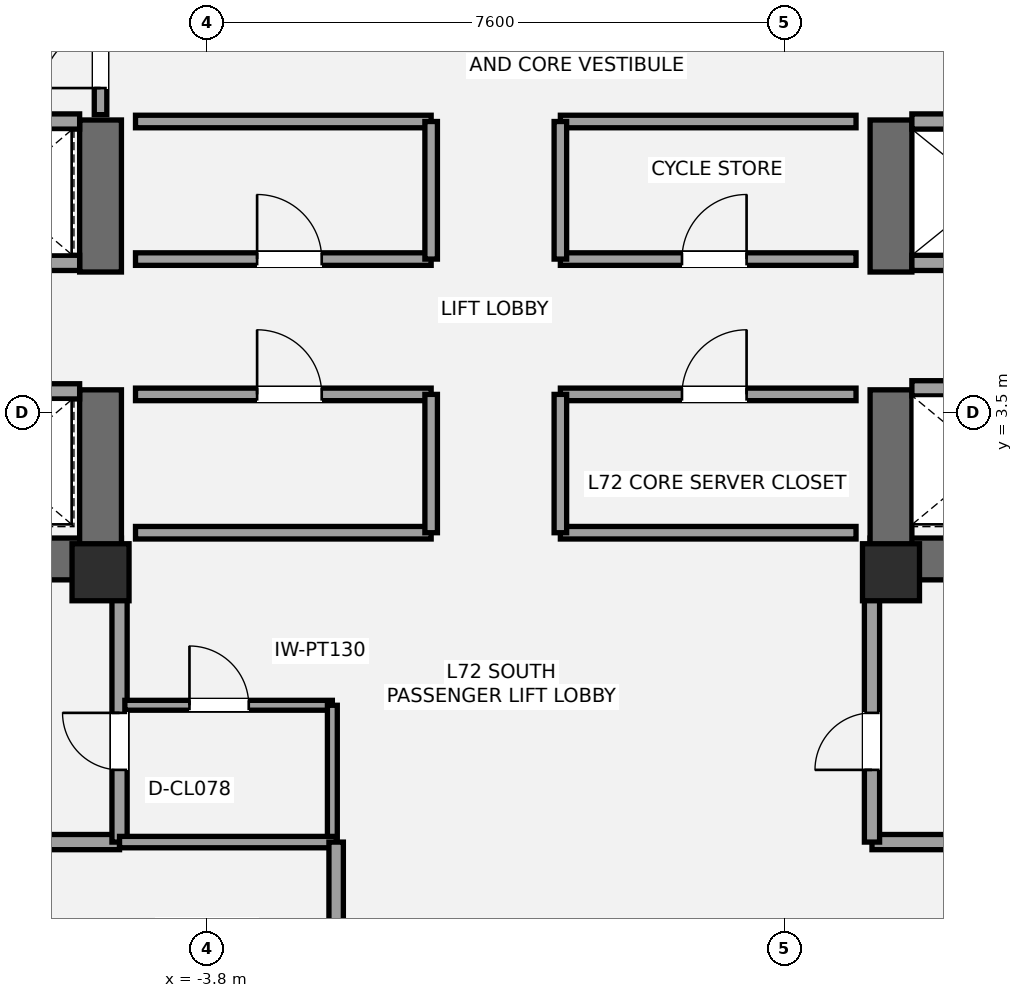
"""IFC4 building model, lengths in metres.
Left out: names, types, materials, properties, quantities, classifications, styles, units other than length and angle.
Written with IfcOpenShell. Run it as: python <this file> out.ifc"""

import sys

from ifc_helpers import new_model, si_unit, direction, frame, frame_2d, origin, origin_2d, place, context, subcontext, project, spatial, rectangle, extrude, element, fill, save


model = new_model("IFC4")
c1 = context("Model", 3, precision=1e-05, world=origin(), true_north=direction((0.0, 1.0)))
c2 = subcontext(c1, "Body", "Model", "MODEL_VIEW")
j1 = project(units=[si_unit("LENGTHUNIT", "METRE"), si_unit("PLANEANGLEUNIT", "RADIAN")], contexts=[c1])
p1 = place(None, origin())
s1 = spatial("IfcSite", under=j1, at=p1, CompositionType="ELEMENT")
p2 = place(p1, origin())
s2 = spatial("IfcBuilding", under=s1, at=p2, CompositionType="ELEMENT")
p3 = place(p2, frame((0.0, 0.0, 254.1)))
s3 = spatial("IfcBuildingStorey", under=s2, at=p3, CompositionType="ELEMENT", Elevation=254.1)
p4 = place(p3, frame((-4.925, 1.575, 0.0), z_axis=(0.0, 0.0, 1.0), x_axis=(-1.0, 0.0, 0.0)))
e1 = element("IfcWall", 1, at=p4, inside=s3, PredefinedType="SHEAR", context=c2, shape_type="SweptSolid", body=[
    extrude(rectangle(XDim=8.775, YDim=0.55, at=frame_2d((4.387, 0.0))), origin(), (0.0, 0.0, 1.0), 3.15),
])
p5 = place(p4, frame((5.375, 0.0, 0.0)))
e2 = element("IfcOpeningElement", 2, at=p5, cuts=e1, PredefinedType="OPENING", context=c2, shape_type="SweptSolid", body=[
    extrude(rectangle(XDim=1.05, YDim=2.15, at=frame_2d((0.525, 1.075))), frame((0.0, 0.285, 0.0), z_axis=(0.0, -1.0, 0.0), x_axis=(1.0, 0.0, 0.0)), (0.0, 0.0, 1.0), 0.57),
])
p6 = place(p4, frame((3.705, 0.0, 0.0)))
e3 = element("IfcOpeningElement", 3, at=p6, cuts=e1, PredefinedType="OPENING", context=c2, shape_type="SweptSolid", body=[
    extrude(rectangle(XDim=1.1, YDim=2.2, at=frame_2d((0.55, 1.1))), frame((0.0, 0.285, 0.0), z_axis=(0.0, -1.0, 0.0), x_axis=(1.0, 0.0, 0.0)), (0.0, 0.0, 1.0), 0.57),
])
p7 = place(p3, frame((-5.2, 1.3, 0.0), z_axis=(0.0, 0.0, 1.0), x_axis=(0.0, 1.0, 0.0)))
e4 = element("IfcWall", 4, at=p7, inside=s3, PredefinedType="SHEAR", context=c2, shape_type="SweptSolid", body=[
    extrude(rectangle(XDim=2.5, YDim=0.55, at=frame_2d((1.25, 0.0))), origin(), (0.0, 0.0, 1.0), 3.15),
])
p8 = place(p3, frame((-5.2, 5.35, 0.0), z_axis=(0.0, 0.0, 1.0), x_axis=(0.0, 1.0, 0.0)))
e5 = element("IfcWall", 5, at=p8, inside=s3, PredefinedType="SHEAR", context=c2, shape_type="SweptSolid", body=[
    extrude(rectangle(XDim=2.0, YDim=0.55, at=frame_2d((1.0, 0.0))), origin(), (0.0, 0.0, 1.0), 3.15),
])
p9 = place(p3, frame((13.7, 1.575, 0.0), z_axis=(0.0, 0.0, 1.0), x_axis=(-1.0, 0.0, 0.0)))
e6 = element("IfcWall", 6, at=p9, inside=s3, PredefinedType="SHEAR", context=c2, shape_type="SweptSolid", body=[
    extrude(rectangle(XDim=8.775, YDim=0.55, at=frame_2d((4.387, 0.0))), origin(), (0.0, 0.0, 1.0), 3.15),
])
p10 = place(p9, frame((2.35, 0.0, 0.0)))
e7 = element("IfcOpeningElement", 7, at=p10, cuts=e6, PredefinedType="OPENING", context=c2, shape_type="SweptSolid", body=[
    extrude(rectangle(XDim=1.05, YDim=2.15, at=frame_2d((0.525, 1.075))), frame((0.0, 0.285, 0.0), z_axis=(0.0, -1.0, 0.0), x_axis=(1.0, 0.0, 0.0)), (0.0, 0.0, 1.0), 0.57),
])
p11 = place(p9, frame((4.35, 0.0, 0.0)))
e8 = element("IfcOpeningElement", 8, at=p11, cuts=e6, PredefinedType="OPENING", context=c2, shape_type="SweptSolid", body=[
    extrude(rectangle(XDim=1.1, YDim=2.2, at=frame_2d((0.55, 1.1))), frame((0.0, 0.285, 0.0), z_axis=(0.0, -1.0, 0.0), x_axis=(1.0, 0.0, 0.0)), (0.0, 0.0, 1.0), 0.57),
])
p12 = place(p3, frame((5.2, 1.3, 0.0), z_axis=(0.0, 0.0, 1.0), x_axis=(0.0, 1.0, 0.0)))
e9 = element("IfcWall", 9, at=p12, inside=s3, PredefinedType="SHEAR", context=c2, shape_type="SweptSolid", body=[
    extrude(rectangle(XDim=2.5, YDim=0.55, at=frame_2d((1.25, 0.0))), origin(), (0.0, 0.0, 1.0), 3.15),
])
p13 = place(p3, frame((5.2, 5.35, 0.0), z_axis=(0.0, 0.0, 1.0), x_axis=(0.0, 1.0, 0.0)))
e10 = element("IfcWall", 10, at=p13, inside=s3, PredefinedType="SHEAR", context=c2, shape_type="SweptSolid", body=[
    extrude(rectangle(XDim=2.0, YDim=0.55, at=frame_2d((1.0, 0.0))), origin(), (0.0, 0.0, 1.0), 3.15),
])
for number, where, z_axis, x_axis in (
    (11, (-5.2, 1.4, 0.0), (0.0, 0.0, 1.0), (1.0, 0.0, 0.0)),
    (12, (5.2, 1.4, 0.0), (0.0, 0.0, 1.0), (1.0, 0.0, 0.0)),
):
    element("IfcColumn", number, at=place(p3, frame(where, z_axis=z_axis, x_axis=x_axis)), inside=s3, PredefinedType="PILASTER", context=c2, shape_type="SweptSolid", body=[
        extrude(rectangle(XDim=0.75, YDim=0.75, at=origin_2d()), origin(), (0.0, 0.0, 1.0), 3.15),
    ])
p14 = place(p3, frame((-7.2, -2.15, 0.0), z_axis=(0.0, 0.0, 1.0), x_axis=(1.0, 0.0, 0.0)))
e13 = element("IfcWall", 13, at=p14, inside=s3, PredefinedType="SOLIDWALL", context=c2, shape_type="SweptSolid", body=[
    extrude(rectangle(XDim=2.25, YDim=0.2, at=frame_2d((1.125, 0.0))), origin(), (0.0, 0.0, 1.0), 2.97),
])
p15 = place(p3, frame((-4.95, -2.15, 0.0), z_axis=(0.0, 0.0, 1.0), x_axis=(0.0, 1.0, 0.0)))
e14 = element("IfcWall", 14, at=p15, inside=s3, PredefinedType="SOLIDWALL", context=c2, shape_type="SweptSolid", body=[
    extrude(rectangle(XDim=3.5, YDim=0.2, at=frame_2d((1.75, 0.0))), origin(), (0.0, 0.0, 1.0), 2.423),
])
p16 = place(p15, frame((0.95, 0.0, 0.0)))
e15 = element("IfcOpeningElement", 15, at=p16, cuts=e14, PredefinedType="OPENING", context=c2, shape_type="SweptSolid", body=[
    extrude(rectangle(XDim=0.75, YDim=2.1, at=frame_2d((0.375, 1.05))), frame((0.0, 0.11, 0.0), z_axis=(0.0, -1.0, 0.0), x_axis=(1.0, 0.0, 0.0)), (0.0, 0.0, 1.0), 0.22),
])
p17 = place(p3, frame((4.95, -2.15, 0.0), z_axis=(0.0, 0.0, 1.0), x_axis=(1.0, 0.0, 0.0)))
e16 = element("IfcWall", 16, at=p17, inside=s3, PredefinedType="SOLIDWALL", context=c2, shape_type="SweptSolid", body=[
    extrude(rectangle(XDim=2.25, YDim=0.2, at=frame_2d((1.125, 0.0))), origin(), (0.0, 0.0, 1.0), 2.97),
])
p18 = place(p3, frame((4.95, -2.15, 0.0), z_axis=(0.0, 0.0, 1.0), x_axis=(0.0, 1.0, 0.0)))
e17 = element("IfcWall", 17, at=p18, inside=s3, PredefinedType="SOLIDWALL", context=c2, shape_type="SweptSolid", body=[
    extrude(rectangle(XDim=3.5, YDim=0.2, at=frame_2d((1.75, 0.0))), origin(), (0.0, 0.0, 1.0), 2.423),
])
p19 = place(p18, frame((0.95, 0.0, 0.0)))
e18 = element("IfcOpeningElement", 18, at=p19, cuts=e17, PredefinedType="OPENING", context=c2, shape_type="SweptSolid", body=[
    extrude(rectangle(XDim=0.75, YDim=2.1, at=frame_2d((0.375, 1.05))), frame((0.0, 0.11, 0.0), z_axis=(0.0, -1.0, 0.0), x_axis=(1.0, 0.0, 0.0)), (0.0, 0.0, 1.0), 0.22),
])
p20 = place(p3, frame((-4.88, -0.35, 0.0), z_axis=(0.0, 0.0, 1.0), x_axis=(1.0, 0.0, 0.0)))
e19 = element("IfcWall", 19, at=p20, inside=s3, PredefinedType="PARTITIONING", context=c2, shape_type="SweptSolid", body=[
    extrude(rectangle(XDim=2.73, YDim=0.13, at=frame_2d((1.365, 0.0))), origin(), (0.0, 0.0, 1.0), 2.97),
])
p21 = place(p20, frame((0.85, 0.0, 0.0)))
e20 = element("IfcOpeningElement", 20, at=p21, cuts=e19, PredefinedType="OPENING", context=c2, shape_type="SweptSolid", body=[
    extrude(rectangle(XDim=0.78, YDim=2.1, at=frame_2d((0.39, 1.05))), frame((0.0, 0.075, 0.0), z_axis=(0.0, -1.0, 0.0), x_axis=(1.0, 0.0, 0.0)), (0.0, 0.0, 1.0), 0.15),
])
p22 = place(p3, frame((-2.15, -2.15, 0.0), z_axis=(0.0, 0.0, 1.0), x_axis=(0.0, 1.0, 0.0)))
e21 = element("IfcWall", 21, at=p22, inside=s3, PredefinedType="PARTITIONING", context=c2, shape_type="SweptSolid", body=[
    extrude(rectangle(XDim=1.8, YDim=0.13, at=frame_2d((0.9, 0.0))), origin(), (0.0, 0.0, 1.0), 2.97),
])
p23 = place(p3, frame((-9.78, 3.78, 0.0), z_axis=(0.0, 0.0, 1.0), x_axis=(1.0, 0.0, 0.0)))
e22 = element("IfcWall", 22, at=p23, inside=s3, PredefinedType="SOLIDWALL", context=c2, shape_type="SweptSolid", body=[
    extrude(rectangle(XDim=4.305, YDim=0.2, at=frame_2d((2.152, 0.0))), origin(), (0.0, 0.0, 1.0), 2.97),
])
p24 = place(p23, frame((2.72, 0.0, 0.0)))
e23 = element("IfcOpeningElement", 23, at=p24, cuts=e22, PredefinedType="OPENING", context=c2, shape_type="SweptSolid", body=[
    extrude(rectangle(XDim=1.1, YDim=2.2, at=frame_2d((0.55, 1.1))), frame((0.0, 0.11, 0.0), z_axis=(0.0, -1.0, 0.0), x_axis=(1.0, 0.0, 0.0)), (0.0, 0.0, 1.0), 0.22),
])
p25 = place(p3, frame((-9.78, 5.47, 0.0), z_axis=(0.0, 0.0, 1.0), x_axis=(1.0, 0.0, 0.0)))
e24 = element("IfcWall", 24, at=p25, inside=s3, PredefinedType="SOLIDWALL", context=c2, shape_type="SweptSolid", body=[
    extrude(rectangle(XDim=4.305, YDim=0.2, at=frame_2d((2.152, 0.0))), origin(), (0.0, 0.0, 1.0), 2.97),
])
p26 = place(p25, frame((0.55, 0.0, 0.0)))
e25 = element("IfcOpeningElement", 25, at=p26, cuts=e24, PredefinedType="OPENING", context=c2, shape_type="SweptSolid", body=[
    extrude(rectangle(XDim=1.1, YDim=2.2, at=frame_2d((0.55, 1.1))), frame((0.0, 0.11, 0.0), z_axis=(0.0, -1.0, 0.0), x_axis=(1.0, 0.0, 0.0)), (0.0, 0.0, 1.0), 0.22),
])
p27 = place(p25, frame((2.72, 0.0, 0.0)))
e26 = element("IfcOpeningElement", 26, at=p27, cuts=e24, PredefinedType="OPENING", context=c2, shape_type="SweptSolid", body=[
    extrude(rectangle(XDim=1.1, YDim=2.2, at=frame_2d((0.55, 1.1))), frame((0.0, 0.11, 0.0), z_axis=(0.0, -1.0, 0.0), x_axis=(1.0, 0.0, 0.0)), (0.0, 0.0, 1.0), 0.22),
])
p28 = place(p3, frame((-9.78, 7.33, 0.0), z_axis=(0.0, 0.0, 1.0), x_axis=(1.0, 0.0, 0.0)))
e27 = element("IfcWall", 27, at=p28, inside=s3, PredefinedType="SOLIDWALL", context=c2, shape_type="SweptSolid", body=[
    extrude(rectangle(XDim=4.305, YDim=0.2, at=frame_2d((2.152, 0.0))), origin(), (0.0, 0.0, 1.0), 2.97),
])
p29 = place(p3, frame((5.475, 3.82, 0.0), z_axis=(0.0, 0.0, 1.0), x_axis=(1.0, 0.0, 0.0)))
e28 = element("IfcWall", 28, at=p29, inside=s3, PredefinedType="SOLIDWALL", context=c2, shape_type="SweptSolid", body=[
    extrude(rectangle(XDim=4.305, YDim=0.2, at=frame_2d((2.152, 0.0))), origin(), (0.0, 0.0, 1.0), 2.97),
])
p30 = place(p29, frame((0.65, 0.0, 0.0)))
e29 = element("IfcOpeningElement", 29, at=p30, cuts=e28, PredefinedType="OPENING", context=c2, shape_type="SweptSolid", body=[
    extrude(rectangle(XDim=1.2, YDim=2.2, at=frame_2d((0.6, 1.1))), frame((0.0, 0.11, 0.0), z_axis=(0.0, -1.0, 0.0), x_axis=(1.0, 0.0, 0.0)), (0.0, 0.0, 1.0), 0.22),
])
for number, where, z_axis, x_axis in (
    (30, (5.475, 5.47, 0.0), (0.0, 0.0, 1.0), (1.0, 0.0, 0.0)),
    (31, (5.475, 7.33, 0.0), (0.0, 0.0, 1.0), (1.0, 0.0, 0.0)),
):
    element("IfcWall", number, at=place(p3, frame(where, z_axis=z_axis, x_axis=x_axis)), inside=s3, PredefinedType="SOLIDWALL", context=c2, shape_type="SweptSolid", body=[
        extrude(rectangle(XDim=4.305, YDim=0.2, at=frame_2d((2.152, 0.0))), origin(), (0.0, 0.0, 1.0), 2.97),
    ])
p31 = place(p3, frame((-4.74, 1.92, 0.0), z_axis=(0.0, 0.0, 1.0), x_axis=(1.0, 0.0, 0.0)))
e32 = element("IfcWall", 32, at=p31, inside=s3, PredefinedType="PARTITIONING", context=c2, shape_type="SweptSolid", body=[
    extrude(rectangle(XDim=3.89, YDim=0.165, at=frame_2d((1.945, 0.0))), origin(), (0.0, 0.0, 1.0), 2.11),
])
p32 = place(p3, frame((-4.74, 3.74, 0.0), z_axis=(0.0, 0.0, 1.0), x_axis=(1.0, 0.0, 0.0)))
e33 = element("IfcWall", 33, at=p32, inside=s3, PredefinedType="PARTITIONING", context=c2, shape_type="SweptSolid", body=[
    extrude(rectangle(XDim=3.89, YDim=0.165, at=frame_2d((1.945, 0.0))), origin(), (0.0, 0.0, 1.0), 2.97),
])
p33 = place(p32, frame((1.6, 0.0, 0.0)))
e34 = element("IfcOpeningElement", 34, at=p33, cuts=e33, PredefinedType="OPENING", context=c2, shape_type="SweptSolid", body=[
    extrude(rectangle(XDim=0.85, YDim=2.1, at=frame_2d((0.425, 1.05))), frame((0.0, 0.093, 0.0), z_axis=(0.0, -1.0, 0.0), x_axis=(1.0, 0.0, 0.0)), (0.0, 0.0, 1.0), 0.185),
])
p34 = place(p3, frame((-0.85, 1.92, 0.0), z_axis=(0.0, 0.0, 1.0), x_axis=(0.0, 1.0, 0.0)))
e35 = element("IfcWall", 35, at=p34, inside=s3, PredefinedType="PARTITIONING", context=c2, shape_type="SweptSolid", body=[
    extrude(rectangle(XDim=1.82, YDim=0.165, at=frame_2d((0.91, 0.0))), origin(), (0.0, 0.0, 1.0), 2.97),
])
p35 = place(p3, frame((0.85, 1.92, 0.0), z_axis=(0.0, 0.0, 1.0), x_axis=(1.0, 0.0, 0.0)))
e36 = element("IfcWall", 36, at=p35, inside=s3, PredefinedType="PARTITIONING", context=c2, shape_type="SweptSolid", body=[
    extrude(rectangle(XDim=3.89, YDim=0.165, at=frame_2d((1.945, 0.0))), origin(), (0.0, 0.0, 1.0), 2.11),
])
p36 = place(p3, frame((0.85, 3.74, 0.0), z_axis=(0.0, 0.0, 1.0), x_axis=(1.0, 0.0, 0.0)))
e37 = element("IfcWall", 37, at=p36, inside=s3, PredefinedType="PARTITIONING", context=c2, shape_type="SweptSolid", body=[
    extrude(rectangle(XDim=3.89, YDim=0.165, at=frame_2d((1.945, 0.0))), origin(), (0.0, 0.0, 1.0), 2.97),
])
p37 = place(p36, frame((1.6, 0.0, 0.0)))
e38 = element("IfcOpeningElement", 38, at=p37, cuts=e37, PredefinedType="OPENING", context=c2, shape_type="SweptSolid", body=[
    extrude(rectangle(XDim=0.85, YDim=2.1, at=frame_2d((0.425, 1.05))), frame((0.0, 0.093, 0.0), z_axis=(0.0, -1.0, 0.0), x_axis=(1.0, 0.0, 0.0)), (0.0, 0.0, 1.0), 0.185),
])
p38 = place(p3, frame((0.85, 1.92, 0.0), z_axis=(0.0, 0.0, 1.0), x_axis=(0.0, 1.0, 0.0)))
e39 = element("IfcWall", 39, at=p38, inside=s3, PredefinedType="PARTITIONING", context=c2, shape_type="SweptSolid", body=[
    extrude(rectangle(XDim=1.82, YDim=0.165, at=frame_2d((0.91, 0.0))), origin(), (0.0, 0.0, 1.0), 2.97),
])
p39 = place(p3, frame((-4.74, 5.52, 0.0), z_axis=(0.0, 0.0, 1.0), x_axis=(1.0, 0.0, 0.0)))
e40 = element("IfcWall", 40, at=p39, inside=s3, PredefinedType="PARTITIONING", context=c2, shape_type="SweptSolid", body=[
    extrude(rectangle(XDim=3.89, YDim=0.165, at=frame_2d((1.945, 0.0))), origin(), (0.0, 0.0, 1.0), 2.97),
])
p40 = place(p39, frame((1.6, 0.0, 0.0)))
e41 = element("IfcOpeningElement", 41, at=p40, cuts=e40, PredefinedType="OPENING", context=c2, shape_type="SweptSolid", body=[
    extrude(rectangle(XDim=0.85, YDim=2.1, at=frame_2d((0.425, 1.05))), frame((0.0, 0.093, 0.0), z_axis=(0.0, -1.0, 0.0), x_axis=(1.0, 0.0, 0.0)), (0.0, 0.0, 1.0), 0.185),
])
p41 = place(p3, frame((-4.74, 7.33, 0.0), z_axis=(0.0, 0.0, 1.0), x_axis=(1.0, 0.0, 0.0)))
e42 = element("IfcWall", 42, at=p41, inside=s3, PredefinedType="PARTITIONING", context=c2, shape_type="SweptSolid", body=[
    extrude(rectangle(XDim=3.89, YDim=0.165, at=frame_2d((1.945, 0.0))), origin(), (0.0, 0.0, 1.0), 2.97),
])
p42 = place(p3, frame((-0.85, 5.52, 0.0), z_axis=(0.0, 0.0, 1.0), x_axis=(0.0, 1.0, 0.0)))
e43 = element("IfcWall", 43, at=p42, inside=s3, PredefinedType="PARTITIONING", context=c2, shape_type="SweptSolid", body=[
    extrude(rectangle(XDim=1.81, YDim=0.165, at=frame_2d((0.905, 0.0))), origin(), (0.0, 0.0, 1.0), 2.97),
])
p43 = place(p3, frame((0.85, 5.52, 0.0), z_axis=(0.0, 0.0, 1.0), x_axis=(1.0, 0.0, 0.0)))
e44 = element("IfcWall", 44, at=p43, inside=s3, PredefinedType="PARTITIONING", context=c2, shape_type="SweptSolid", body=[
    extrude(rectangle(XDim=3.89, YDim=0.165, at=frame_2d((1.945, 0.0))), origin(), (0.0, 0.0, 1.0), 2.97),
])
p44 = place(p43, frame((1.6, 0.0, 0.0)))
e45 = element("IfcOpeningElement", 45, at=p44, cuts=e44, PredefinedType="OPENING", context=c2, shape_type="SweptSolid", body=[
    extrude(rectangle(XDim=0.85, YDim=2.1, at=frame_2d((0.425, 1.05))), frame((0.0, 0.093, 0.0), z_axis=(0.0, -1.0, 0.0), x_axis=(1.0, 0.0, 0.0)), (0.0, 0.0, 1.0), 0.185),
])
p45 = place(p3, frame((0.85, 7.33, 0.0), z_axis=(0.0, 0.0, 1.0), x_axis=(1.0, 0.0, 0.0)))
e46 = element("IfcWall", 46, at=p45, inside=s3, PredefinedType="PARTITIONING", context=c2, shape_type="SweptSolid", body=[
    extrude(rectangle(XDim=3.89, YDim=0.165, at=frame_2d((1.945, 0.0))), origin(), (0.0, 0.0, 1.0), 2.97),
])
p46 = place(p3, frame((0.85, 5.52, 0.0), z_axis=(0.0, 0.0, 1.0), x_axis=(0.0, 1.0, 0.0)))
e47 = element("IfcWall", 47, at=p46, inside=s3, PredefinedType="PARTITIONING", context=c2, shape_type="SweptSolid", body=[
    extrude(rectangle(XDim=1.81, YDim=0.165, at=frame_2d((0.905, 0.0))), origin(), (0.0, 0.0, 1.0), 2.97),
])
p47 = place(p3, frame((-5.2, 7.42, 0.0), z_axis=(0.0, 0.0, 1.0), x_axis=(0.0, 1.0, 0.0)))
e48 = element("IfcWall", 48, at=p47, inside=s3, PredefinedType="PARTITIONING", context=c2, shape_type="SweptSolid", body=[
    extrude(rectangle(XDim=1.58, YDim=0.165, at=frame_2d((0.79, 0.0))), origin(), (0.0, 0.0, 1.0), 2.97),
])
p48 = place(p47, frame((0.35, 0.0, 0.0)))
e49 = element("IfcOpeningElement", 49, at=p48, cuts=e48, PredefinedType="OPENING", context=c2, shape_type="SweptSolid", body=[
    extrude(rectangle(XDim=0.75, YDim=2.1, at=frame_2d((0.375, 1.05))), frame((0.0, 0.093, 0.0), z_axis=(0.0, -1.0, 0.0), x_axis=(1.0, 0.0, 0.0)), (0.0, 0.0, 1.0), 0.185),
])
p49 = place(p3, frame((-4.95, -2.15, 0.0), z_axis=(0.0, 0.0, 1.0), x_axis=(1.0, 0.0, 0.0)))
e50 = element("IfcWall", 50, at=p49, inside=s3, PredefinedType="PLUMBINGWALL", context=c2, shape_type="SweptSolid", body=[
    extrude(rectangle(XDim=2.85, YDim=0.15, at=frame_2d((1.425, 0.0))), origin(), (0.0, 0.0, 1.0), 2.423),
])
p50 = place(p3, frame((-2.1, -4.05, 0.0), z_axis=(0.0, 0.0, 1.0), x_axis=(0.0, 1.0, 0.0)))
e51 = element("IfcWall", 51, at=p50, inside=s3, PredefinedType="PLUMBINGWALL", context=c2, shape_type="SweptSolid", body=[
    extrude(rectangle(XDim=1.9, YDim=0.19, at=frame_2d((0.95, 0.0))), origin(), (0.0, 0.0, 1.0), 2.423),
])
p51 = place(p16, origin())
e52 = element("IfcDoor", 52, at=p51, inside=s3, OperationType="SINGLE_SWING_RIGHT", PredefinedType="DOOR", context=c2, shape_type="SweptSolid", body=[
    extrude(rectangle(XDim=0.75, YDim=2.1, at=frame_2d((0.375, 1.05))), frame((0.0, 0.025, 0.0), z_axis=(0.0, -1.0, 0.0), x_axis=(1.0, 0.0, 0.0)), (0.0, 0.0, 1.0), 0.05),
])
fill(e15, e52)
p52 = place(p19, origin())
e53 = element("IfcDoor", 53, at=p52, inside=s3, OperationType="SINGLE_SWING_LEFT", PredefinedType="DOOR", context=c2, shape_type="SweptSolid", body=[
    extrude(rectangle(XDim=0.75, YDim=2.1, at=frame_2d((0.375, 1.05))), frame((0.0, 0.025, 0.0), z_axis=(0.0, -1.0, 0.0), x_axis=(1.0, 0.0, 0.0)), (0.0, 0.0, 1.0), 0.05),
])
fill(e18, e53)
p53 = place(p21, origin())
e54 = element("IfcDoor", 54, at=p53, inside=s3, OperationType="SINGLE_SWING_LEFT", PredefinedType="DOOR", context=c2, shape_type="SweptSolid", body=[
    extrude(rectangle(XDim=0.78, YDim=2.1, at=frame_2d((0.39, 1.05))), frame((0.0, 0.025, 0.0), z_axis=(0.0, -1.0, 0.0), x_axis=(1.0, 0.0, 0.0)), (0.0, 0.0, 1.0), 0.05),
])
fill(e20, e54)
p54 = place(p33, origin())
e55 = element("IfcDoor", 55, at=p54, inside=s3, OperationType="SINGLE_SWING_LEFT", PredefinedType="DOOR", context=c2, shape_type="SweptSolid", body=[
    extrude(rectangle(XDim=0.85, YDim=2.1, at=frame_2d((0.425, 1.05))), frame((0.0, 0.025, 0.0), z_axis=(0.0, -1.0, 0.0), x_axis=(1.0, 0.0, 0.0)), (0.0, 0.0, 1.0), 0.05),
])
fill(e34, e55)
p55 = place(p37, origin())
e56 = element("IfcDoor", 56, at=p55, inside=s3, OperationType="SINGLE_SWING_RIGHT", PredefinedType="DOOR", context=c2, shape_type="SweptSolid", body=[
    extrude(rectangle(XDim=0.85, YDim=2.1, at=frame_2d((0.425, 1.05))), frame((0.0, 0.025, 0.0), z_axis=(0.0, -1.0, 0.0), x_axis=(1.0, 0.0, 0.0)), (0.0, 0.0, 1.0), 0.05),
])
fill(e38, e56)
p56 = place(p40, origin())
e57 = element("IfcDoor", 57, at=p56, inside=s3, OperationType="SINGLE_SWING_LEFT", PredefinedType="DOOR", context=c2, shape_type="SweptSolid", body=[
    extrude(rectangle(XDim=0.85, YDim=2.1, at=frame_2d((0.425, 1.05))), frame((0.0, 0.025, 0.0), z_axis=(0.0, -1.0, 0.0), x_axis=(1.0, 0.0, 0.0)), (0.0, 0.0, 1.0), 0.05),
])
fill(e41, e57)
p57 = place(p44, origin())
e58 = element("IfcDoor", 58, at=p57, inside=s3, OperationType="SINGLE_SWING_RIGHT", PredefinedType="DOOR", context=c2, shape_type="SweptSolid", body=[
    extrude(rectangle(XDim=0.85, YDim=2.1, at=frame_2d((0.425, 1.05))), frame((0.0, 0.025, 0.0), z_axis=(0.0, -1.0, 0.0), x_axis=(1.0, 0.0, 0.0)), (0.0, 0.0, 1.0), 0.05),
])
fill(e45, e58)
p58 = place(p48, origin())
e59 = element("IfcDoor", 59, at=p58, inside=s3, OperationType="SINGLE_SWING_LEFT", PredefinedType="DOOR", context=c2, shape_type="SweptSolid", body=[
    extrude(rectangle(XDim=0.75, YDim=2.1, at=frame_2d((0.375, 1.05))), frame((0.0, 0.025, 0.0), z_axis=(0.0, -1.0, 0.0), x_axis=(1.0, 0.0, 0.0)), (0.0, 0.0, 1.0), 0.05),
])
fill(e49, e59)
save(model, sys.argv[1])
